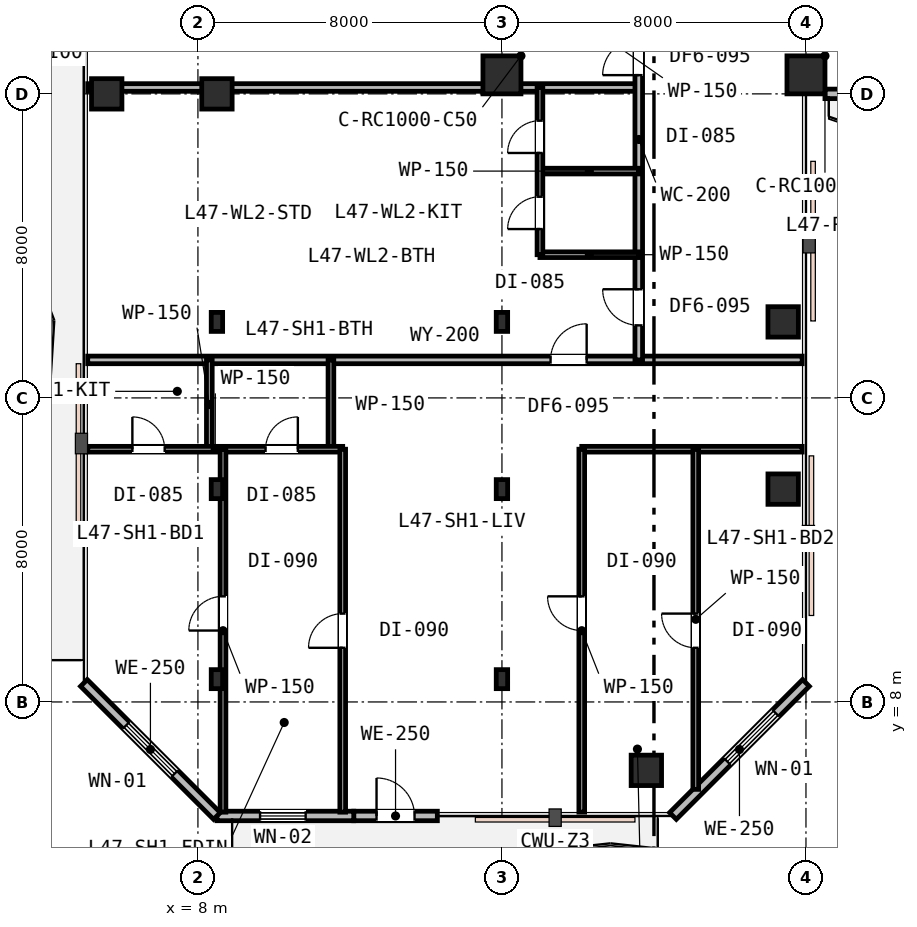
"""IFC4 building model, lengths in metres.
Left out: names, types, materials, properties, quantities, classifications, styles, units other than length and angle.
Written with IfcOpenShell. Run it as: python <this file> out.ifc"""

import sys

from ifc_helpers import new_model, si_unit, direction, frame, frame_2d, origin, origin_2d, place, context, subcontext, project, spatial, rectangle, i_section, extrude, element, fill, save


model = new_model("IFC4")
c1 = context("Model", 3, precision=1e-05, world=origin(), true_north=direction((0.0, 1.0)))
c2 = subcontext(c1, "Body", "Model", "MODEL_VIEW")
j1 = project(units=[si_unit("LENGTHUNIT", "METRE"), si_unit("PLANEANGLEUNIT", "RADIAN")], contexts=[c1])
p1 = place(None, origin())
s1 = spatial("IfcSite", under=j1, at=p1, CompositionType="ELEMENT")
p2 = place(p1, origin())
s2 = spatial("IfcBuilding", under=s1, at=p2, CompositionType="ELEMENT")
p3 = place(p2, frame((0.0, 0.0, 183.0)))
s3 = spatial("IfcBuildingStorey", under=s2, at=p3, CompositionType="ELEMENT", Elevation=183.0)
p4 = place(p3, frame((8.5, 24.0, 0.0), z_axis=(0.0, 0.0, 1.0), x_axis=(1.0, 0.0, 0.0)))
e1 = element("IfcColumn", 1, at=p4, inside=s3, PredefinedType="COLUMN", context=c2, shape_type="SweptSolid", body=[
    extrude(rectangle(XDim=0.8, YDim=0.8, at=origin_2d()), origin(), (0.0, 0.0, 1.0), 3.6),
])
for number, where, z_axis, x_axis in (
    (2, (16.0, 24.5, 0.0), (0.0, 0.0, 1.0), (1.0, 0.0, 0.0)),
    (3, (24.0, 24.5, 0.0), (0.0, 0.0, 1.0), (1.0, 0.0, 0.0)),
):
    element("IfcColumn", number, at=place(p3, frame(where, z_axis=z_axis, x_axis=x_axis)), inside=s3, PredefinedType="COLUMN", context=c2, shape_type="SweptSolid", body=[
        extrude(rectangle(XDim=1.0, YDim=1.0, at=origin_2d()), origin(), (0.0, 0.0, 1.0), 3.6),
    ])
for number, where, z_axis, x_axis in (
    (4, (5.6, 24.0, 0.0), (0.0, 0.0, 1.0), (1.0, 0.0, 0.0)),
    (5, (19.8, 6.2, 0.0), (0.0, 0.0, 1.0), (1.0, 0.0, 0.0)),
    (6, (23.4, 13.6, 0.0), (0.0, 0.0, 1.0), (1.0, 0.0, 0.0)),
    (7, (23.4, 18.0, 0.0), (0.0, 0.0, 1.0), (1.0, 0.0, 0.0)),
):
    element("IfcColumn", number, at=place(p3, frame(where, z_axis=z_axis, x_axis=x_axis)), inside=s3, PredefinedType="COLUMN", context=c2, shape_type="SweptSolid", body=[
        extrude(rectangle(XDim=0.8, YDim=0.8, at=origin_2d()), origin(), (0.0, 0.0, 1.0), 3.6),
    ])
for number, where, z_axis, x_axis in (
    (8, (8.5, 8.6, 0.0), (0.0, 0.0, 1.0), (1.0, 0.0, 0.0)),
    (9, (16.0, 8.6, 0.0), (0.0, 0.0, 1.0), (1.0, 0.0, 0.0)),
    (10, (8.5, 13.6, 0.0), (0.0, 0.0, 1.0), (1.0, 0.0, 0.0)),
    (11, (16.0, 13.6, 0.0), (0.0, 0.0, 1.0), (1.0, 0.0, 0.0)),
    (12, (8.5, 18.0, 0.0), (0.0, 0.0, 1.0), (1.0, 0.0, 0.0)),
    (13, (16.0, 18.0, 0.0), (0.0, 0.0, 1.0), (1.0, 0.0, 0.0)),
):
    element("IfcColumn", number, at=place(p3, frame(where, z_axis=z_axis, x_axis=x_axis)), inside=s3, PredefinedType="COLUMN", context=c2, shape_type="SweptSolid", body=[
        extrude(i_section(OverallWidth=0.3, OverallDepth=0.5, WebThickness=0.015, FlangeThickness=0.028, FilletRadius=0.027, at=origin_2d()), origin(), (0.0, 0.0, 1.0), 3.6),
    ])
p5 = place(p3, frame((12.1, 5.0, 0.0), z_axis=(0.0, 0.0, 1.0), x_axis=(1.0, 0.0, 0.0)))
e14 = element("IfcWall", 14, at=p5, inside=s3, PredefinedType="STANDARD", context=c2, shape_type="SweptSolid", body=[
    extrude(rectangle(XDim=2.2, YDim=0.25, at=frame_2d((1.1, 0.0))), origin(), (0.0, 0.0, 1.0), 3.33),
])
p6 = place(p5, frame((0.6, 0.0, 0.0)))
e15 = element("IfcOpeningElement", 15, at=p6, cuts=e14, PredefinedType="OPENING", context=c2, shape_type="SweptSolid", body=[
    extrude(rectangle(XDim=1.0, YDim=2.15, at=frame_2d((0.5, 1.075))), frame((0.0, 0.135, 0.0), z_axis=(0.0, -1.0, 0.0), x_axis=(1.0, 0.0, 0.0)), (0.0, 0.0, 1.0), 0.27),
])
p7 = place(p3, frame((8.5, 5.0, 0.0), z_axis=(0.0, 0.0, 1.0), x_axis=(1.0, 0.0, 0.0)))
e16 = element("IfcWall", 16, at=p7, inside=s3, PredefinedType="STANDARD", context=c2, shape_type="SweptSolid", body=[
    extrude(rectangle(XDim=3.6, YDim=0.25, at=frame_2d((1.8, 0.0))), origin(), (0.0, 0.0, 1.0), 3.33),
])
p8 = place(p7, frame((1.135, 0.0, 0.85)))
e17 = element("IfcOpeningElement", 17, at=p8, cuts=e16, PredefinedType="OPENING", context=c2, shape_type="SweptSolid", body=[
    extrude(rectangle(XDim=1.2, YDim=1.6, at=frame_2d((0.6, 0.8))), frame((0.0, 0.135, 0.0), z_axis=(0.0, -1.0, 0.0), x_axis=(1.0, 0.0, 0.0)), (0.0, 0.0, 1.0), 0.27),
])
p9 = place(p3, frame((20.5, 5.0, 0.0), z_axis=(0.0, 0.0, 1.0), x_axis=(0.707106781187, 0.707106781187, 0.0)))
e18 = element("IfcWall", 18, at=p9, inside=s3, PredefinedType="STANDARD", context=c2, shape_type="SweptSolid", body=[
    extrude(rectangle(XDim=4.95, YDim=0.25, at=frame_2d((2.475, 0.0))), origin(), (0.0, 0.0, 1.0), 3.33),
])
p10 = place(p9, frame((2.025, 0.0, 0.75)))
e19 = element("IfcOpeningElement", 19, at=p10, cuts=e18, PredefinedType="OPENING", context=c2, shape_type="SweptSolid", body=[
    extrude(rectangle(XDim=1.8, YDim=1.85, at=frame_2d((0.9, 0.925))), frame((0.0, 0.135, 0.0), z_axis=(0.0, -1.0, 0.0), x_axis=(1.0, 0.0, 0.0)), (0.0, 0.0, 1.0), 0.27),
])
p11 = place(p3, frame((24.5, 24.0, 0.0), z_axis=(0.0, 0.0, 1.0), x_axis=(1.0, 0.0, 0.0)))
e20 = element("IfcWall", 20, at=p11, inside=s3, PredefinedType="STANDARD", context=c2, shape_type="SweptSolid", body=[
    extrude(rectangle(XDim=1.35, YDim=0.25, at=frame_2d((0.675, 0.0))), origin(), (0.0, 0.0, 1.0), 3.02),
])
p12 = place(p3, frame((5.0, 8.5, 0.0), z_axis=(0.0, 0.0, 1.0), x_axis=(0.707106781187, -0.707106781187, 0.0)))
e21 = element("IfcWall", 21, at=p12, inside=s3, PredefinedType="STANDARD", context=c2, shape_type="SweptSolid", body=[
    extrude(rectangle(XDim=4.95, YDim=0.25, at=frame_2d((2.475, 0.0))), origin(), (0.0, 0.0, 1.0), 3.33),
])
p13 = place(p12, frame((1.575, 0.0, 0.75)))
e22 = element("IfcOpeningElement", 22, at=p13, cuts=e21, PredefinedType="OPENING", context=c2, shape_type="SweptSolid", body=[
    extrude(rectangle(XDim=1.8, YDim=1.85, at=frame_2d((0.9, 0.925))), frame((0.0, 0.135, 0.0), z_axis=(0.0, -1.0, 0.0), x_axis=(1.0, 0.0, 0.0)), (0.0, 0.0, 1.0), 0.27),
])
p14 = place(p3, frame((5.1, 17.0, 0.0), z_axis=(0.0, 0.0, 1.0), x_axis=(1.0, 0.0, 0.0)))
e23 = element("IfcWall", 23, at=p14, inside=s3, PredefinedType="PARTITIONING", context=c2, shape_type="SweptSolid", body=[
    extrude(rectangle(XDim=18.8, YDim=0.2, at=frame_2d((9.4, 0.0))), origin(), (0.0, 0.0, 1.0), 2.92),
])
p15 = place(p14, frame((12.179, 0.0, 0.0)))
e24 = element("IfcOpeningElement", 24, at=p15, cuts=e23, PredefinedType="OPENING", context=c2, shape_type="SweptSolid", body=[
    extrude(rectangle(XDim=0.95, YDim=2.15, at=frame_2d((0.475, 1.075))), frame((0.0, 0.11, 0.0), z_axis=(0.0, -1.0, 0.0), x_axis=(1.0, 0.0, 0.0)), (0.0, 0.0, 1.0), 0.22),
])
p16 = place(p3, frame((5.1, 24.168, 0.0), z_axis=(0.0, 0.0, 1.0), x_axis=(1.0, 0.0, 0.0)))
e25 = element("IfcWall", 25, at=p16, inside=s3, PredefinedType="PARTITIONING", context=c2, shape_type="SweptSolid", body=[
    extrude(rectangle(XDim=14.5, YDim=0.2, at=frame_2d((7.25, 0.0))), origin(), (0.0, 0.0, 1.0), 2.92),
])
p17 = place(p3, frame((19.6, 17.0, 0.0), z_axis=(0.0, 0.0, 1.0), x_axis=(0.0, 1.0, 0.0)))
e26 = element("IfcWall", 26, at=p17, inside=s3, PredefinedType="PARTITIONING", context=c2, shape_type="SweptSolid", body=[
    extrude(rectangle(XDim=11.6, YDim=0.2, at=frame_2d((5.8, 0.0))), origin(), (0.0, 0.0, 1.0), 2.92),
])
p18 = place(p17, frame((7.493, 0.0, 0.0)))
e27 = element("IfcOpeningElement", 27, at=p18, cuts=e26, PredefinedType="OPENING", context=c2, shape_type="SweptSolid", body=[
    extrude(rectangle(XDim=0.95, YDim=2.15, at=frame_2d((0.475, 1.075))), frame((0.0, 0.11, 0.0), z_axis=(0.0, -1.0, 0.0), x_axis=(1.0, 0.0, 0.0)), (0.0, 0.0, 1.0), 0.22),
])
p19 = place(p17, frame((0.909, 0.0, 0.0)))
e28 = element("IfcOpeningElement", 28, at=p19, cuts=e26, PredefinedType="OPENING", context=c2, shape_type="SweptSolid", body=[
    extrude(rectangle(XDim=0.95, YDim=2.15, at=frame_2d((0.475, 1.075))), frame((0.0, 0.11, 0.0), z_axis=(0.0, -1.0, 0.0), x_axis=(1.0, 0.0, 0.0)), (0.0, 0.0, 1.0), 0.22),
])
for number, where, z_axis, x_axis in (
    (29, (17.0, 19.768, 0.0), (0.0, 0.0, 1.0), (1.0, 0.0, 0.0)),
    (30, (17.0, 21.968, 0.0), (0.0, 0.0, 1.0), (1.0, 0.0, 0.0)),
):
    element("IfcWall", number, at=place(p3, frame(where, z_axis=z_axis, x_axis=x_axis)), inside=s3, PredefinedType="PARTITIONING", context=c2, shape_type="SweptSolid", body=[
        extrude(rectangle(XDim=2.6, YDim=0.15, at=frame_2d((1.3, 0.0))), origin(), (0.0, 0.0, 1.0), 3.33),
    ])
p20 = place(p3, frame((17.0, 19.768, 0.0), z_axis=(0.0, 0.0, 1.0), x_axis=(0.0, 1.0, 0.0)))
e31 = element("IfcWall", 31, at=p20, inside=s3, PredefinedType="PARTITIONING", context=c2, shape_type="SweptSolid", body=[
    extrude(rectangle(XDim=4.4, YDim=0.15, at=frame_2d((2.2, 0.0))), origin(), (0.0, 0.0, 1.0), 2.92),
])
p21 = place(p20, frame((0.675, 0.0, 0.0)))
e32 = element("IfcOpeningElement", 32, at=p21, cuts=e31, PredefinedType="OPENING", context=c2, shape_type="SweptSolid", body=[
    extrude(rectangle(XDim=0.85, YDim=2.15, at=frame_2d((0.425, 1.075))), frame((0.0, 0.085, 0.0), z_axis=(0.0, -1.0, 0.0), x_axis=(1.0, 0.0, 0.0)), (0.0, 0.0, 1.0), 0.17),
])
p22 = place(p20, frame((2.677, 0.0, 0.0)))
e33 = element("IfcOpeningElement", 33, at=p22, cuts=e31, PredefinedType="OPENING", context=c2, shape_type="SweptSolid", body=[
    extrude(rectangle(XDim=0.85, YDim=2.15, at=frame_2d((0.425, 1.075))), frame((0.0, 0.085, 0.0), z_axis=(0.0, -1.0, 0.0), x_axis=(1.0, 0.0, 0.0)), (0.0, 0.0, 1.0), 0.17),
])
p23 = place(p3, frame((11.5, 14.65, 0.0), z_axis=(0.0, 0.0, 1.0), x_axis=(0.0, 1.0, 0.0)))
e34 = element("IfcWall", 34, at=p23, inside=s3, PredefinedType="PARTITIONING", context=c2, shape_type="SweptSolid", body=[
    extrude(rectangle(XDim=2.35, YDim=0.15, at=frame_2d((1.175, 0.0))), origin(), (0.0, 0.0, 1.0), 3.07),
])
p24 = place(p3, frame((8.3, 14.65, 0.0), z_axis=(0.0, 0.0, 1.0), x_axis=(0.0, 1.0, 0.0)))
e35 = element("IfcWall", 35, at=p24, inside=s3, PredefinedType="PARTITIONING", context=c2, shape_type="SweptSolid", body=[
    extrude(rectangle(XDim=2.35, YDim=0.15, at=frame_2d((1.175, 0.0))), origin(), (0.0, 0.0, 1.0), 2.92),
])
p25 = place(p3, frame((5.1, 14.65, 0.0), z_axis=(0.0, 0.0, 1.0), x_axis=(1.0, 0.0, 0.0)))
e36 = element("IfcWall", 36, at=p25, inside=s3, PredefinedType="PARTITIONING", context=c2, shape_type="SweptSolid", body=[
    extrude(rectangle(XDim=6.71, YDim=0.15, at=frame_2d((3.355, 0.0))), origin(), (0.0, 0.0, 1.0), 2.92),
])
p26 = place(p25, frame((1.175, 0.0, 0.0)))
e37 = element("IfcOpeningElement", 37, at=p26, cuts=e36, PredefinedType="OPENING", context=c2, shape_type="SweptSolid", body=[
    extrude(rectangle(XDim=0.85, YDim=2.15, at=frame_2d((0.425, 1.075))), frame((0.0, 0.085, 0.0), z_axis=(0.0, -1.0, 0.0), x_axis=(1.0, 0.0, 0.0)), (0.0, 0.0, 1.0), 0.17),
])
p27 = place(p25, frame((4.679, 0.0, 0.0)))
e38 = element("IfcOpeningElement", 38, at=p27, cuts=e36, PredefinedType="OPENING", context=c2, shape_type="SweptSolid", body=[
    extrude(rectangle(XDim=0.85, YDim=2.15, at=frame_2d((0.425, 1.075))), frame((0.0, 0.085, 0.0), z_axis=(0.0, -1.0, 0.0), x_axis=(1.0, 0.0, 0.0)), (0.0, 0.0, 1.0), 0.17),
])
p28 = place(p3, frame((18.1, 14.65, 0.0), z_axis=(0.0, 0.0, 1.0), x_axis=(1.0, 0.0, 0.0)))
e39 = element("IfcWall", 39, at=p28, inside=s3, PredefinedType="PARTITIONING", context=c2, shape_type="SweptSolid", body=[
    extrude(rectangle(XDim=5.8, YDim=0.15, at=frame_2d((2.9, 0.0))), origin(), (0.0, 0.0, 1.0), 3.02),
])
p29 = place(p3, frame((8.66, 5.1, 0.0), z_axis=(0.0, 0.0, 1.0), x_axis=(0.0, 1.0, 0.0)))
e40 = element("IfcWall", 40, at=p29, inside=s3, PredefinedType="PARTITIONING", context=c2, shape_type="SweptSolid", body=[
    extrude(rectangle(XDim=9.55, YDim=0.15, at=frame_2d((4.775, 0.0))), origin(), (0.0, 0.0, 1.0), 2.92),
])
p30 = place(p29, frame((4.779, 0.0, 0.0)))
e41 = element("IfcOpeningElement", 41, at=p30, cuts=e40, PredefinedType="OPENING", context=c2, shape_type="SweptSolid", body=[
    extrude(rectangle(XDim=0.9, YDim=2.15, at=frame_2d((0.45, 1.075))), frame((0.0, 0.085, 0.0), z_axis=(0.0, -1.0, 0.0), x_axis=(1.0, 0.0, 0.0)), (0.0, 0.0, 1.0), 0.17),
])
p31 = place(p3, frame((21.1, 5.7, 0.0), z_axis=(0.0, 0.0, 1.0), x_axis=(0.0, 1.0, 0.0)))
e42 = element("IfcWall", 42, at=p31, inside=s3, PredefinedType="PARTITIONING", context=c2, shape_type="SweptSolid", body=[
    extrude(rectangle(XDim=8.95, YDim=0.15, at=frame_2d((4.475, 0.0))), origin(), (0.0, 0.0, 1.0), 2.92),
])
p32 = place(p31, frame((3.725, 0.0, 0.0)))
e43 = element("IfcOpeningElement", 43, at=p32, cuts=e42, PredefinedType="OPENING", context=c2, shape_type="SweptSolid", body=[
    extrude(rectangle(XDim=0.9, YDim=2.15, at=frame_2d((0.45, 1.075))), frame((0.0, 0.085, 0.0), z_axis=(0.0, -1.0, 0.0), x_axis=(1.0, 0.0, 0.0)), (0.0, 0.0, 1.0), 0.17),
])
p33 = place(p3, frame((18.1, 5.1, 0.0), z_axis=(0.0, 0.0, 1.0), x_axis=(0.0, 1.0, 0.0)))
e44 = element("IfcWall", 44, at=p33, inside=s3, PredefinedType="PARTITIONING", context=c2, shape_type="SweptSolid", body=[
    extrude(rectangle(XDim=9.55, YDim=0.15, at=frame_2d((4.775, 0.0))), origin(), (0.0, 0.0, 1.0), 2.92),
])
p34 = place(p33, frame((4.779, 0.0, 0.0)))
e45 = element("IfcOpeningElement", 45, at=p34, cuts=e44, PredefinedType="OPENING", context=c2, shape_type="SweptSolid", body=[
    extrude(rectangle(XDim=0.9, YDim=2.15, at=frame_2d((0.45, 1.075))), frame((0.0, 0.085, 0.0), z_axis=(0.0, -1.0, 0.0), x_axis=(1.0, 0.0, 0.0)), (0.0, 0.0, 1.0), 0.17),
])
p35 = place(p3, frame((11.81, 5.1, 0.0), z_axis=(0.0, 0.0, 1.0), x_axis=(0.0, 1.0, 0.0)))
e46 = element("IfcWall", 46, at=p35, inside=s3, PredefinedType="PARTITIONING", context=c2, shape_type="SweptSolid", body=[
    extrude(rectangle(XDim=9.55, YDim=0.15, at=frame_2d((4.775, 0.0))), origin(), (0.0, 0.0, 1.0), 2.92),
])
p36 = place(p35, frame((4.325, 0.0, 0.0)))
e47 = element("IfcOpeningElement", 47, at=p36, cuts=e46, PredefinedType="OPENING", context=c2, shape_type="SweptSolid", body=[
    extrude(rectangle(XDim=0.9, YDim=2.15, at=frame_2d((0.45, 1.075))), frame((0.0, 0.085, 0.0), z_axis=(0.0, -1.0, 0.0), x_axis=(1.0, 0.0, 0.0)), (0.0, 0.0, 1.0), 0.17),
])
p37 = place(p6, origin())
e48 = element("IfcDoor", 48, at=p37, inside=s3, OperationType="SINGLE_SWING_LEFT", PredefinedType="DOOR", context=c2, shape_type="SweptSolid", body=[
    extrude(rectangle(XDim=1.0, YDim=2.15, at=frame_2d((0.5, 1.075))), frame((0.0, 0.025, 0.0), z_axis=(0.0, -1.0, 0.0), x_axis=(1.0, 0.0, 0.0)), (0.0, 0.0, 1.0), 0.05),
])
fill(e15, e48)
p38 = place(p8, origin())
e49 = element("IfcWindow", 49, at=p38, inside=s3, PartitioningType="SINGLE_PANEL", PredefinedType="WINDOW", context=c2, shape_type="SweptSolid", body=[
    extrude(rectangle(XDim=1.2, YDim=1.6, at=frame_2d((0.6, 0.8))), frame((0.0, 0.03, 0.0), z_axis=(0.0, -1.0, 0.0), x_axis=(1.0, 0.0, 0.0)), (0.0, 0.0, 1.0), 0.06),
])
fill(e17, e49)
p39 = place(p10, origin())
e50 = element("IfcWindow", 50, at=p39, inside=s3, PartitioningType="SINGLE_PANEL", PredefinedType="WINDOW", context=c2, shape_type="SweptSolid", body=[
    extrude(rectangle(XDim=1.8, YDim=1.85, at=frame_2d((0.9, 0.925))), frame((0.0, 0.03, 0.0), z_axis=(0.0, -1.0, 0.0), x_axis=(1.0, 0.0, 0.0)), (0.0, 0.0, 1.0), 0.06),
])
fill(e19, e50)
p40 = place(p13, origin())
e51 = element("IfcWindow", 51, at=p40, inside=s3, PartitioningType="SINGLE_PANEL", PredefinedType="WINDOW", context=c2, shape_type="SweptSolid", body=[
    extrude(rectangle(XDim=1.8, YDim=1.85, at=frame_2d((0.9, 0.925))), frame((0.0, 0.03, 0.0), z_axis=(0.0, -1.0, 0.0), x_axis=(1.0, 0.0, 0.0)), (0.0, 0.0, 1.0), 0.06),
])
fill(e22, e51)
p41 = place(p18, origin())
e52 = element("IfcDoor", 52, at=p41, inside=s3, OperationType="SINGLE_SWING_LEFT", PredefinedType="DOOR", context=c2, shape_type="SweptSolid", body=[
    extrude(rectangle(XDim=0.95, YDim=2.15, at=frame_2d((0.475, 1.075))), frame((0.0, 0.025, 0.0), z_axis=(0.0, -1.0, 0.0), x_axis=(1.0, 0.0, 0.0)), (0.0, 0.0, 1.0), 0.05),
])
fill(e27, e52)
p42 = place(p19, origin())
e53 = element("IfcDoor", 53, at=p42, inside=s3, OperationType="SINGLE_SWING_RIGHT", PredefinedType="DOOR", context=c2, shape_type="SweptSolid", body=[
    extrude(rectangle(XDim=0.95, YDim=2.15, at=frame_2d((0.475, 1.075))), frame((0.0, 0.025, 0.0), z_axis=(0.0, -1.0, 0.0), x_axis=(1.0, 0.0, 0.0)), (0.0, 0.0, 1.0), 0.05),
])
fill(e28, e53)
p43 = place(p21, origin())
e54 = element("IfcDoor", 54, at=p43, inside=s3, OperationType="SINGLE_SWING_LEFT", PredefinedType="DOOR", context=c2, shape_type="SweptSolid", body=[
    extrude(rectangle(XDim=0.85, YDim=2.15, at=frame_2d((0.425, 1.075))), frame((0.0, 0.025, 0.0), z_axis=(0.0, -1.0, 0.0), x_axis=(1.0, 0.0, 0.0)), (0.0, 0.0, 1.0), 0.05),
])
fill(e32, e54)
p44 = place(p22, origin())
e55 = element("IfcDoor", 55, at=p44, inside=s3, OperationType="SINGLE_SWING_LEFT", PredefinedType="DOOR", context=c2, shape_type="SweptSolid", body=[
    extrude(rectangle(XDim=0.85, YDim=2.15, at=frame_2d((0.425, 1.075))), frame((0.0, 0.025, 0.0), z_axis=(0.0, -1.0, 0.0), x_axis=(1.0, 0.0, 0.0)), (0.0, 0.0, 1.0), 0.05),
])
fill(e33, e55)
p45 = place(p15, origin())
e56 = element("IfcDoor", 56, at=p45, inside=s3, OperationType="SINGLE_SWING_RIGHT", PredefinedType="DOOR", context=c2, shape_type="SweptSolid", body=[
    extrude(rectangle(XDim=0.95, YDim=2.15, at=frame_2d((0.475, 1.075))), frame((0.0, 0.025, 0.0), z_axis=(0.0, -1.0, 0.0), x_axis=(1.0, 0.0, 0.0)), (0.0, 0.0, 1.0), 0.05),
])
fill(e24, e56)
p46 = place(p26, origin())
e57 = element("IfcDoor", 57, at=p46, inside=s3, OperationType="SINGLE_SWING_LEFT", PredefinedType="DOOR", context=c2, shape_type="SweptSolid", body=[
    extrude(rectangle(XDim=0.85, YDim=2.15, at=frame_2d((0.425, 1.075))), frame((0.0, 0.025, 0.0), z_axis=(0.0, -1.0, 0.0), x_axis=(1.0, 0.0, 0.0)), (0.0, 0.0, 1.0), 0.05),
])
fill(e37, e57)
p47 = place(p27, origin())
e58 = element("IfcDoor", 58, at=p47, inside=s3, OperationType="SINGLE_SWING_RIGHT", PredefinedType="DOOR", context=c2, shape_type="SweptSolid", body=[
    extrude(rectangle(XDim=0.85, YDim=2.15, at=frame_2d((0.425, 1.075))), frame((0.0, 0.025, 0.0), z_axis=(0.0, -1.0, 0.0), x_axis=(1.0, 0.0, 0.0)), (0.0, 0.0, 1.0), 0.05),
])
fill(e38, e58)
p48 = place(p30, origin())
e59 = element("IfcDoor", 59, at=p48, inside=s3, OperationType="SINGLE_SWING_LEFT", PredefinedType="DOOR", context=c2, shape_type="SweptSolid", body=[
    extrude(rectangle(XDim=0.9, YDim=2.15, at=frame_2d((0.45, 1.075))), frame((0.0, 0.025, 0.0), z_axis=(0.0, -1.0, 0.0), x_axis=(1.0, 0.0, 0.0)), (0.0, 0.0, 1.0), 0.05),
])
fill(e41, e59)
p49 = place(p32, origin())
e60 = element("IfcDoor", 60, at=p49, inside=s3, OperationType="SINGLE_SWING_RIGHT", PredefinedType="DOOR", context=c2, shape_type="SweptSolid", body=[
    extrude(rectangle(XDim=0.9, YDim=2.15, at=frame_2d((0.45, 1.075))), frame((0.0, 0.025, 0.0), z_axis=(0.0, -1.0, 0.0), x_axis=(1.0, 0.0, 0.0)), (0.0, 0.0, 1.0), 0.05),
])
fill(e43, e60)
p50 = place(p34, origin())
e61 = element("IfcDoor", 61, at=p50, inside=s3, OperationType="SINGLE_SWING_RIGHT", PredefinedType="DOOR", context=c2, shape_type="SweptSolid", body=[
    extrude(rectangle(XDim=0.9, YDim=2.15, at=frame_2d((0.45, 1.075))), frame((0.0, 0.025, 0.0), z_axis=(0.0, -1.0, 0.0), x_axis=(1.0, 0.0, 0.0)), (0.0, 0.0, 1.0), 0.05),
])
fill(e45, e61)
p51 = place(p36, origin())
e62 = element("IfcDoor", 62, at=p51, inside=s3, OperationType="SINGLE_SWING_LEFT", PredefinedType="DOOR", context=c2, shape_type="SweptSolid", body=[
    extrude(rectangle(XDim=0.9, YDim=2.15, at=frame_2d((0.45, 1.075))), frame((0.0, 0.025, 0.0), z_axis=(0.0, -1.0, 0.0), x_axis=(1.0, 0.0, 0.0)), (0.0, 0.0, 1.0), 0.05),
])
fill(e47, e62)
save(model, sys.argv[1])
